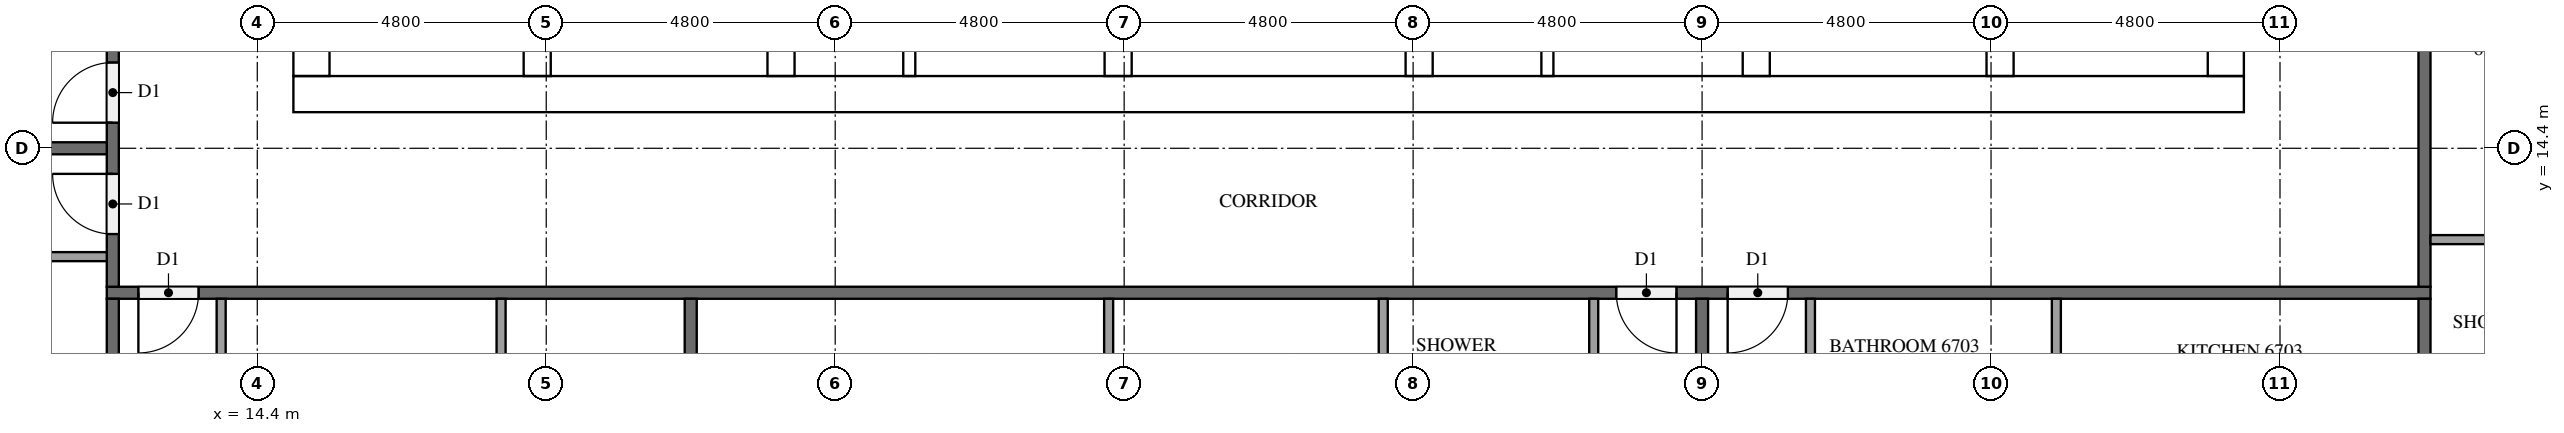
"""IFC4 building model, lengths in metres.
Left out: names, types, materials, properties, quantities, classifications, styles, units other than length and angle.
Written with IfcOpenShell. Run it as: python <this file> out.ifc"""

import sys

from ifc_helpers import new_model, si_unit, direction, frame, frame_2d, origin, place, context, subcontext, project, spatial, rectangle, extrude, element, fill, save


model = new_model("IFC4")
c1 = context("Model", 3, precision=1e-05, world=origin(), true_north=direction((0.0, 1.0)))
c2 = subcontext(c1, "Body", "Model", "MODEL_VIEW")
j1 = project(units=[si_unit("LENGTHUNIT", "METRE"), si_unit("PLANEANGLEUNIT", "RADIAN")], contexts=[c1])
p1 = place(None, origin())
s1 = spatial("IfcSite", under=j1, at=p1, CompositionType="ELEMENT")
p2 = place(p1, origin())
s2 = spatial("IfcBuilding", under=s1, at=p2, CompositionType="ELEMENT")
p3 = place(p2, frame((0.0, 0.0, 256.2)))
s3 = spatial("IfcBuildingStorey", under=s2, at=p3, CompositionType="ELEMENT", Elevation=256.2)
p4 = place(p3, frame((15.0, 15.3, 0.0), z_axis=(0.0, 0.0, 1.0), x_axis=(1.0, 0.0, 0.0)))
e1 = element("IfcWall", 1, at=p4, inside=s3, PredefinedType="SHEAR", context=c2, shape_type="SweptSolid", body=[
    extrude(rectangle(XDim=32.4, YDim=0.6, at=frame_2d((16.2, 0.0))), origin(), (0.0, 0.0, 1.0), 3.2),
])
p5 = place(p4, frame((15.3, 0.0, 0.0)))
e2 = element("IfcOpeningElement", 2, at=p5, cuts=e1, PredefinedType="OPENING", context=c2, shape_type="SweptSolid", body=[
    extrude(rectangle(XDim=1.8, YDim=2.1, at=frame_2d((0.9, 1.05))), frame((0.0, 0.31, 0.0), z_axis=(0.0, -1.0, 0.0), x_axis=(1.0, 0.0, 0.0)), (0.0, 0.0, 1.0), 0.62),
])
p6 = place(p3, frame((15.3, 15.6, 0.0), z_axis=(0.0, 0.0, 1.0), x_axis=(0.0, 1.0, 0.0)))
e3 = element("IfcWall", 3, at=p6, inside=s3, PredefinedType="SHEAR", context=c2, shape_type="SweptSolid", body=[
    extrude(rectangle(XDim=21.6, YDim=0.6, at=frame_2d((10.8, 0.0))), origin(), (0.0, 0.0, 1.0), 3.2),
])
p7 = place(p6, frame((5.16, 0.0, 0.0)))
e4 = element("IfcOpeningElement", 4, at=p7, cuts=e3, PredefinedType="OPENING", context=c2, shape_type="SweptSolid", body=[
    extrude(rectangle(XDim=1.2, YDim=2.1, at=frame_2d((0.6, 1.05))), frame((0.0, 0.31, 0.0), z_axis=(0.0, -1.0, 0.0), x_axis=(1.0, 0.0, 0.0)), (0.0, 0.0, 1.0), 0.62),
])
p8 = place(p3, frame((47.1, 15.6, 0.0), z_axis=(0.0, 0.0, 1.0), x_axis=(0.0, 1.0, 0.0)))
e5 = element("IfcWall", 5, at=p8, inside=s3, PredefinedType="SHEAR", context=c2, shape_type="SweptSolid", body=[
    extrude(rectangle(XDim=21.6, YDim=0.6, at=frame_2d((10.8, 0.0))), origin(), (0.0, 0.0, 1.0), 3.2),
])
p9 = place(p8, frame((10.5, 0.0, 0.0)))
e6 = element("IfcOpeningElement", 6, at=p9, cuts=e5, PredefinedType="OPENING", context=c2, shape_type="SweptSolid", body=[
    extrude(rectangle(XDim=1.2, YDim=2.1, at=frame_2d((0.6, 1.05))), frame((0.0, 0.31, 0.0), z_axis=(0.0, -1.0, 0.0), x_axis=(1.0, 0.0, 0.0)), (0.0, 0.0, 1.0), 0.62),
])
p10 = place(p3, frame((19.05, 15.6, 0.0), z_axis=(0.0, 0.0, 1.0), x_axis=(0.0, 1.0, 0.0)))
e7 = element("IfcWall", 7, at=p10, inside=s3, PredefinedType="SHEAR", context=c2, shape_type="SweptSolid", body=[
    extrude(rectangle(XDim=15.425, YDim=0.45, at=frame_2d((7.712, 0.0))), origin(), (0.0, 0.0, 1.0), 3.2),
])
p11 = place(p10, frame((9.85, 0.0, 0.0)))
e8 = element("IfcOpeningElement", 8, at=p11, cuts=e7, PredefinedType="OPENING", context=c2, shape_type="SweptSolid", body=[
    extrude(rectangle(XDim=1.1, YDim=2.1, at=frame_2d((0.55, 1.05))), frame((0.0, 0.235, 0.0), z_axis=(0.0, -1.0, 0.0), x_axis=(1.0, 0.0, 0.0)), (0.0, 0.0, 1.0), 0.47),
])
p12 = place(p10, frame((13.35, 0.0, 0.0)))
e9 = element("IfcOpeningElement", 9, at=p12, cuts=e7, PredefinedType="OPENING", context=c2, shape_type="SweptSolid", body=[
    extrude(rectangle(XDim=1.1, YDim=2.1, at=frame_2d((0.55, 1.05))), frame((0.0, 0.235, 0.0), z_axis=(0.0, -1.0, 0.0), x_axis=(1.0, 0.0, 0.0)), (0.0, 0.0, 1.0), 0.47),
])
p13 = place(p10, frame((0.6, 0.0, 0.0)))
e10 = element("IfcOpeningElement", 10, at=p13, cuts=e7, PredefinedType="OPENING", context=c2, shape_type="SweptSolid", body=[
    extrude(rectangle(XDim=1.2, YDim=2.1, at=frame_2d((0.6, 1.05))), frame((0.0, 0.235, 0.0), z_axis=(0.0, -1.0, 0.0), x_axis=(1.0, 0.0, 0.0)), (0.0, 0.0, 1.0), 0.47),
])
p14 = place(p3, frame((23.1, 15.6, 0.0), z_axis=(0.0, 0.0, 1.0), x_axis=(0.0, 1.0, 0.0)))
e11 = element("IfcWall", 11, at=p14, inside=s3, PredefinedType="SHEAR", context=c2, shape_type="SweptSolid", body=[
    extrude(rectangle(XDim=21.6, YDim=0.45, at=frame_2d((10.8, 0.0))), origin(), (0.0, 0.0, 1.0), 3.2),
])
p15 = place(p3, frame((39.3, 15.6, 0.0), z_axis=(0.0, 0.0, 1.0), x_axis=(0.0, 1.0, 0.0)))
e12 = element("IfcWall", 12, at=p15, inside=s3, PredefinedType="SHEAR", context=c2, shape_type="SweptSolid", body=[
    extrude(rectangle(XDim=8.65, YDim=0.45, at=frame_2d((4.325, 0.0))), origin(), (0.0, 0.0, 1.0), 3.2),
])
p16 = place(p3, frame((43.35, 15.6, 0.0), z_axis=(0.0, 0.0, 1.0), x_axis=(0.0, 1.0, 0.0)))
e13 = element("IfcWall", 13, at=p16, inside=s3, PredefinedType="SHEAR", context=c2, shape_type="SweptSolid", body=[
    extrude(rectangle(XDim=8.65, YDim=0.45, at=frame_2d((4.325, 0.0))), origin(), (0.0, 0.0, 1.0), 3.2),
])
p17 = place(p16, frame((0.6, 0.0, 0.0)))
e14 = element("IfcOpeningElement", 14, at=p17, cuts=e13, PredefinedType="OPENING", context=c2, shape_type="SweptSolid", body=[
    extrude(rectangle(XDim=1.2, YDim=2.1, at=frame_2d((0.6, 1.05))), frame((0.0, 0.235, 0.0), z_axis=(0.0, -1.0, 0.0), x_axis=(1.0, 0.0, 0.0)), (0.0, 0.0, 1.0), 0.47),
])
for number, where, z_axis, x_axis in (
    (15, (28.7, 15.6, 0.0), (0.0, 0.0, 1.0), (0.0, 1.0, 0.0)),
    (16, (33.7, 15.6, 0.0), (0.0, 0.0, 1.0), (0.0, 1.0, 0.0)),
):
    element("IfcWall", number, at=place(p3, frame(where, z_axis=z_axis, x_axis=x_axis)), inside=s3, PredefinedType="SHEAR", context=c2, shape_type="SweptSolid", body=[
        extrude(rectangle(XDim=2.925, YDim=0.45, at=frame_2d((1.462, 0.0))), origin(), (0.0, 0.0, 1.0), 3.2),
    ])
for number, where, z_axis, x_axis in (
    (17, (25.23, 15.6, 0.0), (0.0, 0.0, 1.0), (0.0, 1.0, 0.0)),
    (18, (35.831, 15.6, 0.0), (0.0, 0.0, 1.0), (0.0, 1.0, 0.0)),
):
    element("IfcWall", number, at=place(p3, frame(where, z_axis=z_axis, x_axis=x_axis)), inside=s3, PredefinedType="PARTITIONING", context=c2, shape_type="SweptSolid", body=[
        extrude(rectangle(XDim=2.925, YDim=0.2, at=frame_2d((1.462, 0.0))), origin(), (0.0, 0.0, 1.0), 3.2),
    ])
p18 = place(p3, frame((50.5, 12.0, 0.0), z_axis=(0.0, 0.0, 1.0), x_axis=(-1.0, 0.0, 0.0)))
e19 = element("IfcWall", 19, at=p18, inside=s3, PredefinedType="PARTITIONING", context=c2, shape_type="SweptSolid", body=[
    extrude(rectangle(XDim=38.6, YDim=0.2, at=frame_2d((19.3, 0.0))), origin(), (0.0, 0.0, 1.0), 3.2),
])
p19 = place(p18, frame((37.075, 0.0, 0.0)))
e20 = element("IfcOpeningElement", 20, at=p19, cuts=e19, PredefinedType="OPENING", context=c2, shape_type="SweptSolid", body=[
    extrude(rectangle(XDim=1.0, YDim=2.1, at=frame_2d((0.5, 1.05))), frame((0.0, 0.11, 0.0), z_axis=(0.0, -1.0, 0.0), x_axis=(1.0, 0.0, 0.0)), (0.0, 0.0, 1.0), 0.22),
])
p20 = place(p18, frame((12.525, 0.0, 0.0)))
e21 = element("IfcOpeningElement", 21, at=p20, cuts=e19, PredefinedType="OPENING", context=c2, shape_type="SweptSolid", body=[
    extrude(rectangle(XDim=1.0, YDim=2.1, at=frame_2d((0.5, 1.05))), frame((0.0, 0.11, 0.0), z_axis=(0.0, -1.0, 0.0), x_axis=(1.0, 0.0, 0.0)), (0.0, 0.0, 1.0), 0.22),
])
p21 = place(p18, frame((10.675, 0.0, 0.0)))
e22 = element("IfcOpeningElement", 22, at=p21, cuts=e19, PredefinedType="OPENING", context=c2, shape_type="SweptSolid", body=[
    extrude(rectangle(XDim=1.0, YDim=2.1, at=frame_2d((0.5, 1.05))), frame((0.0, 0.11, 0.0), z_axis=(0.0, -1.0, 0.0), x_axis=(1.0, 0.0, 0.0)), (0.0, 0.0, 1.0), 0.22),
])
p22 = place(p3, frame((50.4, 40.7, 0.0), z_axis=(0.0, 0.0, 1.0), x_axis=(0.0, -1.0, 0.0)))
e23 = element("IfcWall", 23, at=p22, inside=s3, PredefinedType="PARTITIONING", context=c2, shape_type="SweptSolid", body=[
    extrude(rectangle(XDim=28.6, YDim=0.2, at=frame_2d((14.3, 0.0))), origin(), (0.0, 0.0, 1.0), 3.2),
])
p23 = place(p22, frame((19.525, 0.0, 0.0)))
e24 = element("IfcOpeningElement", 24, at=p23, cuts=e23, PredefinedType="OPENING", context=c2, shape_type="SweptSolid", body=[
    extrude(rectangle(XDim=1.0, YDim=2.1, at=frame_2d((0.5, 1.05))), frame((0.0, 0.11, 0.0), z_axis=(0.0, -1.0, 0.0), x_axis=(1.0, 0.0, 0.0)), (0.0, 0.0, 1.0), 0.22),
])
p24 = place(p22, frame((17.675, 0.0, 0.0)))
e25 = element("IfcOpeningElement", 25, at=p24, cuts=e23, PredefinedType="OPENING", context=c2, shape_type="SweptSolid", body=[
    extrude(rectangle(XDim=1.0, YDim=2.1, at=frame_2d((0.5, 1.05))), frame((0.0, 0.11, 0.0), z_axis=(0.0, -1.0, 0.0), x_axis=(1.0, 0.0, 0.0)), (0.0, 0.0, 1.0), 0.22),
])
p25 = place(p22, frame((0.325, 0.0, 0.0)))
e26 = element("IfcOpeningElement", 26, at=p25, cuts=e23, PredefinedType="OPENING", context=c2, shape_type="SweptSolid", body=[
    extrude(rectangle(XDim=1.0, YDim=2.1, at=frame_2d((0.5, 1.05))), frame((0.0, 0.11, 0.0), z_axis=(0.0, -1.0, 0.0), x_axis=(1.0, 0.0, 0.0)), (0.0, 0.0, 1.0), 0.22),
])
p26 = place(p3, frame((12.0, 12.1, 0.0), z_axis=(0.0, 0.0, 1.0), x_axis=(0.0, 1.0, 0.0)))
e27 = element("IfcWall", 27, at=p26, inside=s3, PredefinedType="PARTITIONING", context=c2, shape_type="SweptSolid", body=[
    extrude(rectangle(XDim=28.6, YDim=0.2, at=frame_2d((14.3, 0.0))), origin(), (0.0, 0.0, 1.0), 3.2),
])
p27 = place(p26, frame((26.725, 0.0, 0.0)))
e28 = element("IfcOpeningElement", 28, at=p27, cuts=e27, PredefinedType="OPENING", context=c2, shape_type="SweptSolid", body=[
    extrude(rectangle(XDim=1.0, YDim=2.1, at=frame_2d((0.5, 1.05))), frame((0.0, 0.11, 0.0), z_axis=(0.0, -1.0, 0.0), x_axis=(1.0, 0.0, 0.0)), (0.0, 0.0, 1.0), 0.22),
])
p28 = place(p26, frame((24.875, 0.0, 0.0)))
e29 = element("IfcOpeningElement", 29, at=p28, cuts=e27, PredefinedType="OPENING", context=c2, shape_type="SweptSolid", body=[
    extrude(rectangle(XDim=1.0, YDim=2.1, at=frame_2d((0.5, 1.05))), frame((0.0, 0.11, 0.0), z_axis=(0.0, -1.0, 0.0), x_axis=(1.0, 0.0, 0.0)), (0.0, 0.0, 1.0), 0.22),
])
p29 = place(p26, frame((17.675, 0.0, 0.0)))
e30 = element("IfcOpeningElement", 30, at=p29, cuts=e27, PredefinedType="OPENING", context=c2, shape_type="SweptSolid", body=[
    extrude(rectangle(XDim=1.0, YDim=2.1, at=frame_2d((0.5, 1.05))), frame((0.0, 0.11, 0.0), z_axis=(0.0, -1.0, 0.0), x_axis=(1.0, 0.0, 0.0)), (0.0, 0.0, 1.0), 0.22),
])
p30 = place(p26, frame((2.725, 0.0, 0.0)))
e31 = element("IfcOpeningElement", 31, at=p30, cuts=e27, PredefinedType="OPENING", context=c2, shape_type="SweptSolid", body=[
    extrude(rectangle(XDim=1.0, YDim=2.1, at=frame_2d((0.5, 1.05))), frame((0.0, 0.11, 0.0), z_axis=(0.0, -1.0, 0.0), x_axis=(1.0, 0.0, 0.0)), (0.0, 0.0, 1.0), 0.22),
])
p31 = place(p26, frame((0.875, 0.0, 0.0)))
e32 = element("IfcOpeningElement", 32, at=p31, cuts=e27, PredefinedType="OPENING", context=c2, shape_type="SweptSolid", body=[
    extrude(rectangle(XDim=1.0, YDim=2.1, at=frame_2d((0.5, 1.05))), frame((0.0, 0.11, 0.0), z_axis=(0.0, -1.0, 0.0), x_axis=(1.0, 0.0, 0.0)), (0.0, 0.0, 1.0), 0.22),
])
for number, where, z_axis, x_axis in (
    (33, (21.6, 11.9, 0.0), (0.0, 0.0, 1.0), (0.0, -1.0, 0.0)),
    (34, (12.0, 4.9, 0.0), (0.0, 0.0, 1.0), (0.0, 1.0, 0.0)),
    (35, (38.4, 11.9, 0.0), (0.0, 0.0, 1.0), (0.0, -1.0, 0.0)),
    (36, (50.4, 11.9, 0.0), (0.0, 0.0, 1.0), (0.0, -1.0, 0.0)),
):
    element("IfcWall", number, at=place(p3, frame(where, z_axis=z_axis, x_axis=x_axis)), inside=s3, PredefinedType="PARTITIONING", context=c2, shape_type="SweptSolid", body=[
        extrude(rectangle(XDim=7.0, YDim=0.2, at=frame_2d((3.5, 0.0))), origin(), (0.0, 0.0, 1.0), 3.2),
    ])
p32 = place(p3, frame((0.1, 14.4, 0.0), z_axis=(0.0, 0.0, 1.0), x_axis=(1.0, 0.0, 0.0)))
e37 = element("IfcWall", 37, at=p32, inside=s3, PredefinedType="PARTITIONING", context=c2, shape_type="SweptSolid", body=[
    extrude(rectangle(XDim=11.8, YDim=0.2, at=frame_2d((5.9, 0.0))), origin(), (0.0, 0.0, 1.0), 3.2),
])
p33 = place(p3, frame((18.45, 11.9, 0.0), z_axis=(0.0, 0.0, 1.0), x_axis=(0.0, -1.0, 0.0)))
e38 = element("IfcWall", 38, at=p33, inside=s3, PredefinedType="PARTITIONING", context=c2, shape_type="SweptSolid", body=[
    extrude(rectangle(XDim=2.375, YDim=0.15, at=frame_2d((1.188, 0.0))), origin(), (0.0, 0.0, 1.0), 3.2),
])
p34 = place(p3, frame((13.8, 11.9, 0.0), z_axis=(0.0, 0.0, 1.0), x_axis=(0.0, -1.0, 0.0)))
e39 = element("IfcWall", 39, at=p34, inside=s3, PredefinedType="PARTITIONING", context=c2, shape_type="SweptSolid", body=[
    extrude(rectangle(XDim=2.525, YDim=0.15, at=frame_2d((1.262, 0.0))), origin(), (0.0, 0.0, 1.0), 3.2),
])
for number, where, z_axis, x_axis in (
    (40, (33.104, 11.9, 0.0), (0.0, 0.0, 1.0), (0.0, -1.0, 0.0)),
    (41, (28.542, 11.9, 0.0), (0.0, 0.0, 1.0), (0.0, -1.0, 0.0)),
):
    element("IfcWall", number, at=place(p3, frame(where, z_axis=z_axis, x_axis=x_axis)), inside=s3, PredefinedType="PARTITIONING", context=c2, shape_type="SweptSolid", body=[
        extrude(rectangle(XDim=2.075, YDim=0.15, at=frame_2d((1.038, 0.0))), origin(), (0.0, 0.0, 1.0), 3.2),
    ])
p35 = place(p3, frame((36.6, 11.9, 0.0), z_axis=(0.0, 0.0, 1.0), x_axis=(0.0, -1.0, 0.0)))
e42 = element("IfcWall", 42, at=p35, inside=s3, PredefinedType="PARTITIONING", context=c2, shape_type="SweptSolid", body=[
    extrude(rectangle(XDim=2.225, YDim=0.15, at=frame_2d((1.112, 0.0))), origin(), (0.0, 0.0, 1.0), 3.2),
])
p36 = place(p3, frame((44.285, 11.9, 0.0), z_axis=(0.0, 0.0, 1.0), x_axis=(0.0, -1.0, 0.0)))
e43 = element("IfcWall", 43, at=p36, inside=s3, PredefinedType="PARTITIONING", context=c2, shape_type="SweptSolid", body=[
    extrude(rectangle(XDim=1.775, YDim=0.15, at=frame_2d((0.887, 0.0))), origin(), (0.0, 0.0, 1.0), 3.2),
])
p37 = place(p3, frame((40.2, 11.9, 0.0), z_axis=(0.0, 0.0, 1.0), x_axis=(0.0, -1.0, 0.0)))
e44 = element("IfcWall", 44, at=p37, inside=s3, PredefinedType="PARTITIONING", context=c2, shape_type="SweptSolid", body=[
    extrude(rectangle(XDim=1.925, YDim=0.15, at=frame_2d((0.962, 0.0))), origin(), (0.0, 0.0, 1.0), 3.2),
])
p38 = place(p3, frame((50.5, 12.883, 0.0), z_axis=(0.0, 0.0, 1.0), x_axis=(1.0, 0.0, 0.0)))
e45 = element("IfcWall", 45, at=p38, inside=s3, PredefinedType="PARTITIONING", context=c2, shape_type="SweptSolid", body=[
    extrude(rectangle(XDim=2.075, YDim=0.15, at=frame_2d((1.038, 0.0))), origin(), (0.0, 0.0, 1.0), 3.2),
])
p39 = place(p3, frame((11.9, 12.6, 0.0), z_axis=(0.0, 0.0, 1.0), x_axis=(-1.0, 0.0, 0.0)))
e46 = element("IfcWall", 46, at=p39, inside=s3, PredefinedType="PARTITIONING", context=c2, shape_type="SweptSolid", body=[
    extrude(rectangle(XDim=4.025, YDim=0.15, at=frame_2d((2.012, 0.0))), origin(), (0.0, 0.0, 1.0), 3.2),
])
p40 = place(p5, frame((1.8, 0.0, 0.0), z_axis=(0.0, 0.0, 1.0), x_axis=(-1.0, 0.0, 0.0)))
e47 = element("IfcDoor", 47, at=p40, inside=s3, OperationType="DOUBLE_DOOR_SINGLE_SWING", PredefinedType="DOOR", context=c2, shape_type="SweptSolid", body=[
    extrude(rectangle(XDim=1.8, YDim=2.1, at=frame_2d((0.9, 1.05))), frame((0.0, 0.025, 0.0), z_axis=(0.0, -1.0, 0.0), x_axis=(1.0, 0.0, 0.0)), (0.0, 0.0, 1.0), 0.05),
])
fill(e2, e47)
p41 = place(p19, origin())
e48 = element("IfcDoor", 48, at=p41, inside=s3, OperationType="SINGLE_SWING_RIGHT", PredefinedType="DOOR", context=c2, shape_type="SweptSolid", body=[
    extrude(rectangle(XDim=1.0, YDim=2.1, at=frame_2d((0.5, 1.05))), frame((0.0, 0.025, 0.0), z_axis=(0.0, -1.0, 0.0), x_axis=(1.0, 0.0, 0.0)), (0.0, 0.0, 1.0), 0.05),
])
fill(e20, e48)
p42 = place(p20, origin())
e49 = element("IfcDoor", 49, at=p42, inside=s3, OperationType="SINGLE_SWING_LEFT", PredefinedType="DOOR", context=c2, shape_type="SweptSolid", body=[
    extrude(rectangle(XDim=1.0, YDim=2.1, at=frame_2d((0.5, 1.05))), frame((0.0, 0.025, 0.0), z_axis=(0.0, -1.0, 0.0), x_axis=(1.0, 0.0, 0.0)), (0.0, 0.0, 1.0), 0.05),
])
fill(e21, e49)
p43 = place(p21, origin())
e50 = element("IfcDoor", 50, at=p43, inside=s3, OperationType="SINGLE_SWING_RIGHT", PredefinedType="DOOR", context=c2, shape_type="SweptSolid", body=[
    extrude(rectangle(XDim=1.0, YDim=2.1, at=frame_2d((0.5, 1.05))), frame((0.0, 0.025, 0.0), z_axis=(0.0, -1.0, 0.0), x_axis=(1.0, 0.0, 0.0)), (0.0, 0.0, 1.0), 0.05),
])
fill(e22, e50)
p44 = place(p30, origin())
e51 = element("IfcDoor", 51, at=p44, inside=s3, OperationType="SINGLE_SWING_LEFT", PredefinedType="DOOR", context=c2, shape_type="SweptSolid", body=[
    extrude(rectangle(XDim=1.0, YDim=2.1, at=frame_2d((0.5, 1.05))), frame((0.0, 0.025, 0.0), z_axis=(0.0, -1.0, 0.0), x_axis=(1.0, 0.0, 0.0)), (0.0, 0.0, 1.0), 0.05),
])
fill(e31, e51)
p45 = place(p31, origin())
e52 = element("IfcDoor", 52, at=p45, inside=s3, OperationType="SINGLE_SWING_RIGHT", PredefinedType="DOOR", context=c2, shape_type="SweptSolid", body=[
    extrude(rectangle(XDim=1.0, YDim=2.1, at=frame_2d((0.5, 1.05))), frame((0.0, 0.025, 0.0), z_axis=(0.0, -1.0, 0.0), x_axis=(1.0, 0.0, 0.0)), (0.0, 0.0, 1.0), 0.05),
])
fill(e32, e52)
save(model, sys.argv[1])
